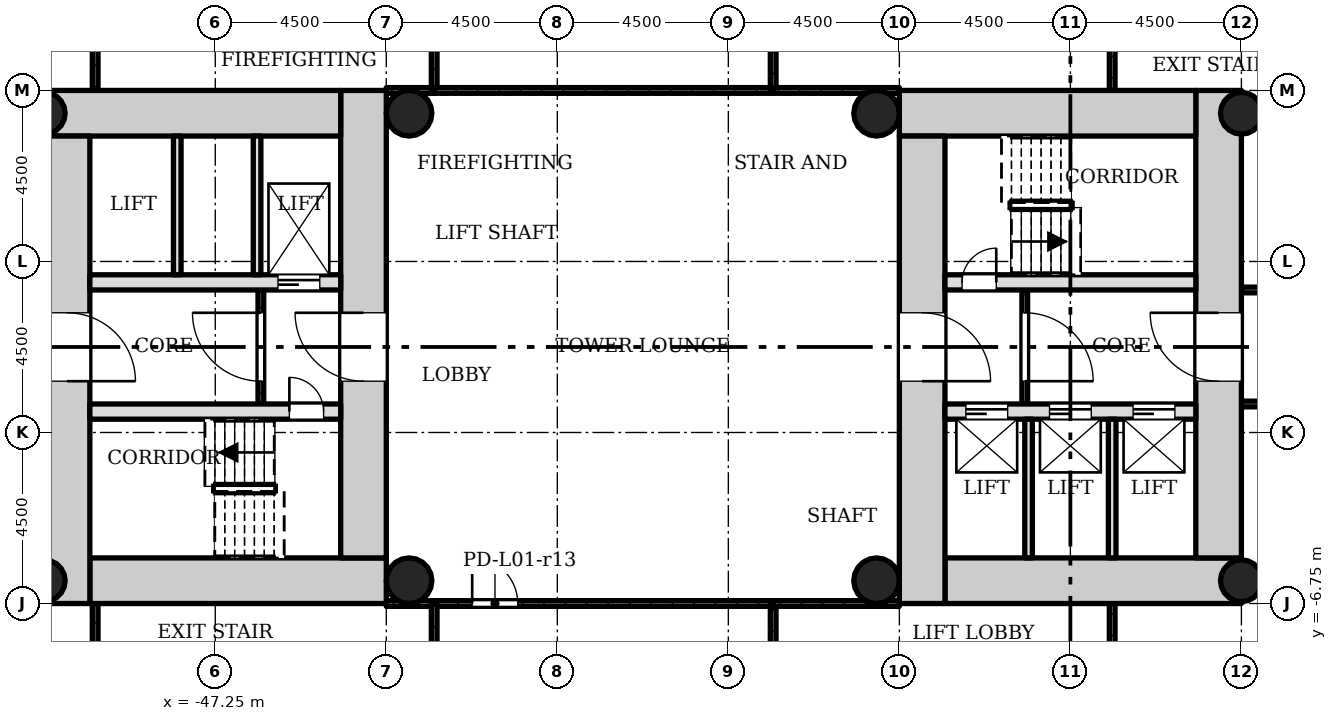
"""IFC4 building model, lengths in metres.
Left out: names, types, materials, properties, quantities, classifications, styles, units other than length and angle.
Written with IfcOpenShell. Run it as: python <this file> out.ifc"""

import sys

from ifc_helpers import new_model, si_unit, direction, frame, frame_2d, origin, origin_2d, place, context, subcontext, project, spatial, rectangle, hollow_circle, extrude, element, fill, save


model = new_model("IFC4")
c1 = context("Model", 3, precision=1e-05, world=origin(), true_north=direction((0.0, 1.0)))
c2 = subcontext(c1, "Body", "Model", "MODEL_VIEW")
j1 = project(units=[si_unit("LENGTHUNIT", "METRE"), si_unit("PLANEANGLEUNIT", "RADIAN")], contexts=[c1])
p1 = place(None, origin())
s1 = spatial("IfcSite", under=j1, at=p1, CompositionType="ELEMENT")
p2 = place(p1, origin())
s2 = spatial("IfcBuilding", under=s1, at=p2, CompositionType="ELEMENT")
p3 = place(p2, frame((0.0, 0.0, 6.0)))
s3 = spatial("IfcBuildingStorey", under=s2, at=p3, CompositionType="ELEMENT", Elevation=6.0)
p4 = place(p3, frame((-28.05, -6.15, 0.0), z_axis=(0.0, 0.0, 1.0), x_axis=(1.0, 0.0, 0.0)))
e1 = element("IfcWall", 1, at=p4, inside=s3, PredefinedType="SHEAR", context=c2, shape_type="SweptSolid", body=[
    extrude(rectangle(XDim=7.8, YDim=1.2, at=frame_2d((3.9, 0.0))), origin(), (0.0, 0.0, 1.0), 5.0),
])
p5 = place(p3, frame((-20.85, -5.55, 0.0), z_axis=(0.0, 0.0, 1.0), x_axis=(0.0, 1.0, 0.0)))
e2 = element("IfcWall", 2, at=p5, inside=s3, PredefinedType="SHEAR", context=c2, shape_type="SweptSolid", body=[
    extrude(rectangle(XDim=12.3, YDim=1.2, at=frame_2d((6.15, 0.0))), origin(), (0.0, 0.0, 1.0), 5.0),
])
p6 = place(p5, frame((4.65, 0.0, 0.0)))
e3 = element("IfcOpeningElement", 3, at=p6, cuts=e2, PredefinedType="OPENING", context=c2, shape_type="SweptSolid", body=[
    extrude(rectangle(XDim=1.8, YDim=2.1, at=frame_2d((0.9, 1.05))), frame((0.0, 0.61, 0.0), z_axis=(0.0, -1.0, 0.0), x_axis=(1.0, 0.0, 0.0)), (0.0, 0.0, 1.0), 1.22),
])
p7 = place(p3, frame((-21.45, 6.15, 0.0), z_axis=(0.0, 0.0, 1.0), x_axis=(-1.0, 0.0, 0.0)))
e4 = element("IfcWall", 4, at=p7, inside=s3, PredefinedType="SHEAR", context=c2, shape_type="SweptSolid", body=[
    extrude(rectangle(XDim=7.8, YDim=1.2, at=frame_2d((3.9, 0.0))), origin(), (0.0, 0.0, 1.0), 5.0),
])
p8 = place(p3, frame((-28.65, 5.55, 0.0), z_axis=(0.0, 0.0, 1.0), x_axis=(0.0, -1.0, 0.0)))
e5 = element("IfcWall", 5, at=p8, inside=s3, PredefinedType="SHEAR", context=c2, shape_type="SweptSolid", body=[
    extrude(rectangle(XDim=12.3, YDim=1.2, at=frame_2d((6.15, 0.0))), origin(), (0.0, 0.0, 1.0), 5.0),
])
p9 = place(p8, frame((4.65, 0.0, 0.0)))
e6 = element("IfcOpeningElement", 6, at=p9, cuts=e5, PredefinedType="OPENING", context=c2, shape_type="SweptSolid", body=[
    extrude(rectangle(XDim=1.8, YDim=2.1, at=frame_2d((0.9, 1.05))), frame((0.0, 0.61, 0.0), z_axis=(0.0, -1.0, 0.0), x_axis=(1.0, 0.0, 0.0)), (0.0, 0.0, 1.0), 1.22),
])
p10 = place(p3, frame((-28.05, -1.7, 0.0), z_axis=(0.0, 0.0, 1.0), x_axis=(1.0, 0.0, 0.0)))
e7 = element("IfcWall", 7, at=p10, inside=s3, PredefinedType="SHEAR", context=c2, shape_type="SweptSolid", body=[
    extrude(rectangle(XDim=6.6, YDim=0.4, at=frame_2d((3.3, 0.0))), origin(), (0.0, 0.0, 1.0), 5.0),
])
p11 = place(p10, frame((0.55, 0.0, 0.0)))
e8 = element("IfcOpeningElement", 8, at=p11, cuts=e7, PredefinedType="OPENING", context=c2, shape_type="SweptSolid", body=[
    extrude(rectangle(XDim=1.1, YDim=2.1, at=frame_2d((0.55, 1.05))), frame((0.0, 0.21, 0.0), z_axis=(0.0, -1.0, 0.0), x_axis=(1.0, 0.0, 0.0)), (0.0, 0.0, 1.0), 0.42),
])
p12 = place(p10, frame((2.75, 0.0, 0.0)))
e9 = element("IfcOpeningElement", 9, at=p12, cuts=e7, PredefinedType="OPENING", context=c2, shape_type="SweptSolid", body=[
    extrude(rectangle(XDim=1.1, YDim=2.1, at=frame_2d((0.55, 1.05))), frame((0.0, 0.21, 0.0), z_axis=(0.0, -1.0, 0.0), x_axis=(1.0, 0.0, 0.0)), (0.0, 0.0, 1.0), 0.42),
])
p13 = place(p10, frame((4.95, 0.0, 0.0)))
e10 = element("IfcOpeningElement", 10, at=p13, cuts=e7, PredefinedType="OPENING", context=c2, shape_type="SweptSolid", body=[
    extrude(rectangle(XDim=1.1, YDim=2.1, at=frame_2d((0.55, 1.05))), frame((0.0, 0.21, 0.0), z_axis=(0.0, -1.0, 0.0), x_axis=(1.0, 0.0, 0.0)), (0.0, 0.0, 1.0), 0.42),
])
p14 = place(p3, frame((-28.05, 1.7, 0.0), z_axis=(0.0, 0.0, 1.0), x_axis=(1.0, 0.0, 0.0)))
e11 = element("IfcWall", 11, at=p14, inside=s3, PredefinedType="SHEAR", context=c2, shape_type="SweptSolid", body=[
    extrude(rectangle(XDim=6.6, YDim=0.4, at=frame_2d((3.3, 0.0))), origin(), (0.0, 0.0, 1.0), 5.0),
])
p15 = place(p14, frame((0.45, 0.0, 0.0)))
e12 = element("IfcOpeningElement", 12, at=p15, cuts=e11, PredefinedType="OPENING", context=c2, shape_type="SweptSolid", body=[
    extrude(rectangle(XDim=0.9, YDim=2.1, at=frame_2d((0.45, 1.05))), frame((0.0, 0.21, 0.0), z_axis=(0.0, -1.0, 0.0), x_axis=(1.0, 0.0, 0.0)), (0.0, 0.0, 1.0), 0.42),
])
p16 = place(p3, frame((-50.55, -6.15, 0.0), z_axis=(0.0, 0.0, 1.0), x_axis=(1.0, 0.0, 0.0)))
e13 = element("IfcWall", 13, at=p16, inside=s3, PredefinedType="SHEAR", context=c2, shape_type="SweptSolid", body=[
    extrude(rectangle(XDim=7.8, YDim=1.2, at=frame_2d((3.9, 0.0))), origin(), (0.0, 0.0, 1.0), 5.0),
])
p17 = place(p3, frame((-43.35, -5.55, 0.0), z_axis=(0.0, 0.0, 1.0), x_axis=(0.0, 1.0, 0.0)))
e14 = element("IfcWall", 14, at=p17, inside=s3, PredefinedType="SHEAR", context=c2, shape_type="SweptSolid", body=[
    extrude(rectangle(XDim=12.3, YDim=1.2, at=frame_2d((6.15, 0.0))), origin(), (0.0, 0.0, 1.0), 5.0),
])
p18 = place(p17, frame((4.65, 0.0, 0.0)))
e15 = element("IfcOpeningElement", 15, at=p18, cuts=e14, PredefinedType="OPENING", context=c2, shape_type="SweptSolid", body=[
    extrude(rectangle(XDim=1.8, YDim=2.1, at=frame_2d((0.9, 1.05))), frame((0.0, 0.61, 0.0), z_axis=(0.0, -1.0, 0.0), x_axis=(1.0, 0.0, 0.0)), (0.0, 0.0, 1.0), 1.22),
])
p19 = place(p3, frame((-43.95, 6.15, 0.0), z_axis=(0.0, 0.0, 1.0), x_axis=(-1.0, 0.0, 0.0)))
e16 = element("IfcWall", 16, at=p19, inside=s3, PredefinedType="SHEAR", context=c2, shape_type="SweptSolid", body=[
    extrude(rectangle(XDim=7.8, YDim=1.2, at=frame_2d((3.9, 0.0))), origin(), (0.0, 0.0, 1.0), 5.0),
])
p20 = place(p3, frame((-51.15, 5.55, 0.0), z_axis=(0.0, 0.0, 1.0), x_axis=(0.0, -1.0, 0.0)))
e17 = element("IfcWall", 17, at=p20, inside=s3, PredefinedType="SHEAR", context=c2, shape_type="SweptSolid", body=[
    extrude(rectangle(XDim=12.3, YDim=1.2, at=frame_2d((6.15, 0.0))), origin(), (0.0, 0.0, 1.0), 5.0),
])
p21 = place(p20, frame((4.65, 0.0, 0.0)))
e18 = element("IfcOpeningElement", 18, at=p21, cuts=e17, PredefinedType="OPENING", context=c2, shape_type="SweptSolid", body=[
    extrude(rectangle(XDim=1.8, YDim=2.1, at=frame_2d((0.9, 1.05))), frame((0.0, 0.61, 0.0), z_axis=(0.0, -1.0, 0.0), x_axis=(1.0, 0.0, 0.0)), (0.0, 0.0, 1.0), 1.22),
])
p22 = place(p3, frame((-50.55, -1.7, 0.0), z_axis=(0.0, 0.0, 1.0), x_axis=(1.0, 0.0, 0.0)))
e19 = element("IfcWall", 19, at=p22, inside=s3, PredefinedType="SHEAR", context=c2, shape_type="SweptSolid", body=[
    extrude(rectangle(XDim=6.6, YDim=0.4, at=frame_2d((3.3, 0.0))), origin(), (0.0, 0.0, 1.0), 5.0),
])
p23 = place(p22, frame((5.25, 0.0, 0.0)))
e20 = element("IfcOpeningElement", 20, at=p23, cuts=e19, PredefinedType="OPENING", context=c2, shape_type="SweptSolid", body=[
    extrude(rectangle(XDim=0.9, YDim=2.1, at=frame_2d((0.45, 1.05))), frame((0.0, 0.21, 0.0), z_axis=(0.0, -1.0, 0.0), x_axis=(1.0, 0.0, 0.0)), (0.0, 0.0, 1.0), 0.42),
])
p24 = place(p3, frame((-50.55, 1.7, 0.0), z_axis=(0.0, 0.0, 1.0), x_axis=(1.0, 0.0, 0.0)))
e21 = element("IfcWall", 21, at=p24, inside=s3, PredefinedType="SHEAR", context=c2, shape_type="SweptSolid", body=[
    extrude(rectangle(XDim=6.6, YDim=0.4, at=frame_2d((3.3, 0.0))), origin(), (0.0, 0.0, 1.0), 5.0),
])
p25 = place(p24, frame((4.95, 0.0, 0.0)))
e22 = element("IfcOpeningElement", 22, at=p25, cuts=e21, PredefinedType="OPENING", context=c2, shape_type="SweptSolid", body=[
    extrude(rectangle(XDim=1.1, YDim=2.1, at=frame_2d((0.55, 1.05))), frame((0.0, 0.21, 0.0), z_axis=(0.0, -1.0, 0.0), x_axis=(1.0, 0.0, 0.0)), (0.0, 0.0, 1.0), 0.42),
])
for number, where, z_axis, x_axis in (
    (23, (-20.25, -6.15, 0.0), (0.0, 0.0, 1.0), (1.0, 0.0, 0.0)),
    (24, (-20.25, 6.15, 0.0), (0.0, 0.0, 1.0), (1.0, 0.0, 0.0)),
    (25, (-51.75, -6.15, 0.0), (0.0, 0.0, 1.0), (1.0, 0.0, 0.0)),
    (26, (-51.75, 6.15, 0.0), (0.0, 0.0, 1.0), (1.0, 0.0, 0.0)),
):
    element("IfcColumn", number, at=place(p3, frame(where, z_axis=z_axis, x_axis=x_axis)), inside=s3, PredefinedType="COLUMN", context=c2, shape_type="SweptSolid", body=[
        extrude(hollow_circle(Radius=0.55, WallThickness=0.04, at=origin_2d()), origin(), (0.0, 0.0, 1.0), 5.0),
    ])
for number, where, z_axis, x_axis in (
    (27, (-42.15, -6.15, 0.0), (0.0, 0.0, 1.0), (1.0, 0.0, 0.0)),
    (28, (-29.85, -6.15, 0.0), (0.0, 0.0, 1.0), (1.0, 0.0, 0.0)),
    (29, (-29.85, 6.15, 0.0), (0.0, 0.0, 1.0), (1.0, 0.0, 0.0)),
    (30, (-42.15, 6.15, 0.0), (0.0, 0.0, 1.0), (1.0, 0.0, 0.0)),
):
    element("IfcColumn", number, at=place(p3, frame(where, z_axis=z_axis, x_axis=x_axis)), inside=s3, PredefinedType="COLUMN", context=c2, shape_type="SweptSolid", body=[
        extrude(hollow_circle(Radius=0.6, WallThickness=0.045, at=origin_2d()), origin(), (0.0, 0.0, 1.0), 5.0),
    ])
p26 = place(p3, frame((-25.95, -1.5, 0.0), z_axis=(0.0, 0.0, 1.0), x_axis=(0.0, 1.0, 0.0)))
e31 = element("IfcWall", 31, at=p26, inside=s3, PredefinedType="PARTITIONING", context=c2, shape_type="SweptSolid", body=[
    extrude(rectangle(XDim=3.0, YDim=0.15, at=frame_2d((1.5, 0.0))), origin(), (0.0, 0.0, 1.0), 4.58),
])
p27 = place(p26, frame((0.6, 0.0, 0.0)))
e32 = element("IfcOpeningElement", 32, at=p27, cuts=e31, PredefinedType="OPENING", context=c2, shape_type="SweptSolid", body=[
    extrude(rectangle(XDim=1.8, YDim=2.1, at=frame_2d((0.9, 1.05))), frame((0.0, 0.085, 0.0), z_axis=(0.0, -1.0, 0.0), x_axis=(1.0, 0.0, 0.0)), (0.0, 0.0, 1.0), 0.17),
])
for number, where, z_axis, x_axis in (
    (33, (-25.85, -5.55, 0.0), (0.0, 0.0, 1.0), (0.0, 1.0, 0.0)),
    (34, (-23.65, -5.55, 0.0), (0.0, 0.0, 1.0), (0.0, 1.0, 0.0)),
):
    element("IfcWall", number, at=place(p3, frame(where, z_axis=z_axis, x_axis=x_axis)), inside=s3, PredefinedType="SOLIDWALL", context=c2, shape_type="SweptSolid", body=[
        extrude(rectangle(XDim=3.65, YDim=0.2, at=frame_2d((1.825, 0.0))), origin(), (0.0, 0.0, 1.0), 4.58),
    ])
p28 = place(p3, frame((-46.05, 1.5, 0.0), z_axis=(0.0, 0.0, 1.0), x_axis=(0.0, -1.0, 0.0)))
e35 = element("IfcWall", 35, at=p28, inside=s3, PredefinedType="PARTITIONING", context=c2, shape_type="SweptSolid", body=[
    extrude(rectangle(XDim=3.0, YDim=0.15, at=frame_2d((1.5, 0.0))), origin(), (0.0, 0.0, 1.0), 4.58),
])
p29 = place(p28, frame((0.6, 0.0, 0.0)))
e36 = element("IfcOpeningElement", 36, at=p29, cuts=e35, PredefinedType="OPENING", context=c2, shape_type="SweptSolid", body=[
    extrude(rectangle(XDim=1.8, YDim=2.1, at=frame_2d((0.9, 1.05))), frame((0.0, 0.085, 0.0), z_axis=(0.0, -1.0, 0.0), x_axis=(1.0, 0.0, 0.0)), (0.0, 0.0, 1.0), 0.17),
])
for number, where, z_axis, x_axis in (
    (37, (-46.15, 5.55, 0.0), (0.0, 0.0, 1.0), (0.0, -1.0, 0.0)),
    (38, (-48.25, 5.55, 0.0), (0.0, 0.0, 1.0), (0.0, -1.0, 0.0)),
):
    element("IfcWall", number, at=place(p3, frame(where, z_axis=z_axis, x_axis=x_axis)), inside=s3, PredefinedType="SOLIDWALL", context=c2, shape_type="SweptSolid", body=[
        extrude(rectangle(XDim=3.65, YDim=0.2, at=frame_2d((1.825, 0.0))), origin(), (0.0, 0.0, 1.0), 4.58),
    ])
p30 = place(p3, frame((-50.41, -6.75, 0.0), z_axis=(0.0, 0.0, 1.0), x_axis=(0.0, -1.0, 0.0)))
e39 = element("IfcWall", 39, at=p30, inside=s3, PredefinedType="PARTITIONING", context=c2, shape_type="SweptSolid", body=[
    extrude(rectangle(XDim=16.75, YDim=0.15, at=frame_2d((8.375, 0.0))), origin(), (0.0, 0.0, 1.0), 4.58),
])
for number, where, z_axis, x_axis in (
    (40, (-42.75, -6.75, 0.0), (0.0, 0.0, 1.0), (1.0, 0.0, 0.0)),
    (41, (-41.49, 6.75, 0.0), (0.0, 0.0, 1.0), (-1.0, 0.0, 0.0)),
):
    element("IfcWall", number, at=place(p3, frame(where, z_axis=z_axis, x_axis=x_axis)), inside=s3, PredefinedType="PARTITIONING", context=c2, shape_type="SweptSolid", body=[
        extrude(rectangle(XDim=1.26, YDim=0.15, at=frame_2d((0.63, 0.0))), origin(), (0.0, 0.0, 1.0), 4.58),
    ])
for number, where, z_axis, x_axis in (
    (42, (-50.41, 6.75, 0.0), (0.0, 0.0, 1.0), (0.0, 1.0, 0.0)),
    (43, (-41.49, 26.5, 0.0), (0.0, 0.0, 1.0), (0.0, -1.0, 0.0)),
):
    element("IfcWall", number, at=place(p3, frame(where, z_axis=z_axis, x_axis=x_axis)), inside=s3, PredefinedType="PARTITIONING", context=c2, shape_type="SweptSolid", body=[
        extrude(rectangle(XDim=19.75, YDim=0.15, at=frame_2d((9.875, 0.0))), origin(), (0.0, 0.0, 1.0), 4.58),
    ])
p31 = place(p3, frame((-41.49, -6.75, 0.0), z_axis=(0.0, 0.0, 1.0), x_axis=(1.0, 0.0, 0.0)))
e44 = element("IfcWall", 44, at=p31, inside=s3, PredefinedType="PARTITIONING", context=c2, shape_type="SweptSolid", body=[
    extrude(rectangle(XDim=8.92, YDim=0.15, at=frame_2d((4.46, 0.0))), origin(), (0.0, 0.0, 1.0), 4.58),
])
p32 = place(p31, frame((1.0, 0.0, 0.0)))
e45 = element("IfcOpeningElement", 45, at=p32, cuts=e44, PredefinedType="OPENING", context=c2, shape_type="SweptSolid", body=[
    extrude(rectangle(XDim=1.2, YDim=2.1, at=frame_2d((0.6, 1.05))), frame((0.0, 0.085, 0.0), z_axis=(0.0, -1.0, 0.0), x_axis=(1.0, 0.0, 0.0)), (0.0, 0.0, 1.0), 0.17),
])
for number, where, z_axis, x_axis in (
    (46, (-41.49, -23.5, 0.0), (0.0, 0.0, 1.0), (0.0, 1.0, 0.0)),
    (47, (-32.57, -6.75, 0.0), (0.0, 0.0, 1.0), (0.0, -1.0, 0.0)),
):
    element("IfcWall", number, at=place(p3, frame(where, z_axis=z_axis, x_axis=x_axis)), inside=s3, PredefinedType="PARTITIONING", context=c2, shape_type="SweptSolid", body=[
        extrude(rectangle(XDim=16.75, YDim=0.15, at=frame_2d((8.375, 0.0))), origin(), (0.0, 0.0, 1.0), 4.58),
    ])
p33 = place(p3, frame((-32.57, 6.75, 0.0), z_axis=(0.0, 0.0, 1.0), x_axis=(-1.0, 0.0, 0.0)))
e48 = element("IfcWall", 48, at=p33, inside=s3, PredefinedType="PARTITIONING", context=c2, shape_type="SweptSolid", body=[
    extrude(rectangle(XDim=8.92, YDim=0.15, at=frame_2d((4.46, 0.0))), origin(), (0.0, 0.0, 1.0), 4.58),
])
p34 = place(p3, frame((-32.57, 26.5, 0.0), z_axis=(0.0, 0.0, 1.0), x_axis=(0.0, -1.0, 0.0)))
e49 = element("IfcWall", 49, at=p34, inside=s3, PredefinedType="PARTITIONING", context=c2, shape_type="SweptSolid", body=[
    extrude(rectangle(XDim=19.75, YDim=0.15, at=frame_2d((9.875, 0.0))), origin(), (0.0, 0.0, 1.0), 4.58),
])
p35 = place(p3, frame((-32.57, -6.75, 0.0), z_axis=(0.0, 0.0, 1.0), x_axis=(1.0, 0.0, 0.0)))
e50 = element("IfcWall", 50, at=p35, inside=s3, PredefinedType="PARTITIONING", context=c2, shape_type="SweptSolid", body=[
    extrude(rectangle(XDim=3.32, YDim=0.15, at=frame_2d((1.66, 0.0))), origin(), (0.0, 0.0, 1.0), 4.58),
])
p36 = place(p3, frame((-23.65, -6.75, 0.0), z_axis=(0.0, 0.0, 1.0), x_axis=(0.0, -1.0, 0.0)))
e51 = element("IfcWall", 51, at=p36, inside=s3, PredefinedType="PARTITIONING", context=c2, shape_type="SweptSolid", body=[
    extrude(rectangle(XDim=16.75, YDim=0.15, at=frame_2d((8.375, 0.0))), origin(), (0.0, 0.0, 1.0), 4.58),
])
p37 = place(p3, frame((-29.25, 6.75, 0.0), z_axis=(0.0, 0.0, 1.0), x_axis=(-1.0, 0.0, 0.0)))
e52 = element("IfcWall", 52, at=p37, inside=s3, PredefinedType="PARTITIONING", context=c2, shape_type="SweptSolid", body=[
    extrude(rectangle(XDim=3.32, YDim=0.15, at=frame_2d((1.66, 0.0))), origin(), (0.0, 0.0, 1.0), 4.58),
])
p38 = place(p3, frame((-23.65, 26.5, 0.0), z_axis=(0.0, 0.0, 1.0), x_axis=(0.0, -1.0, 0.0)))
e53 = element("IfcWall", 53, at=p38, inside=s3, PredefinedType="PARTITIONING", context=c2, shape_type="SweptSolid", body=[
    extrude(rectangle(XDim=19.75, YDim=0.15, at=frame_2d((9.875, 0.0))), origin(), (0.0, 0.0, 1.0), 4.58),
])
for number, where, z_axis, x_axis in (
    (54, (-20.25, -1.5, 0.0), (0.0, 0.0, 1.0), (1.0, 0.0, 0.0)),
    (55, (-14.73, 1.5, 0.0), (0.0, 0.0, 1.0), (-1.0, 0.0, 0.0)),
):
    element("IfcWall", number, at=place(p3, frame(where, z_axis=z_axis, x_axis=x_axis)), inside=s3, PredefinedType="PARTITIONING", context=c2, shape_type="SweptSolid", body=[
        extrude(rectangle(XDim=5.52, YDim=0.15, at=frame_2d((2.76, 0.0))), origin(), (0.0, 0.0, 1.0), 4.58),
    ])
p39 = place(p27, origin())
e56 = element("IfcDoor", 56, at=p39, inside=s3, OperationType="SINGLE_SWING_LEFT", PredefinedType="DOOR", context=c2, shape_type="SweptSolid", body=[
    extrude(rectangle(XDim=1.8, YDim=2.1, at=frame_2d((0.9, 1.05))), frame((0.0, 0.025, 0.0), z_axis=(0.0, -1.0, 0.0), x_axis=(1.0, 0.0, 0.0)), (0.0, 0.0, 1.0), 0.05),
])
fill(e32, e56)
p40 = place(p29, origin())
e57 = element("IfcDoor", 57, at=p40, inside=s3, OperationType="SINGLE_SWING_LEFT", PredefinedType="DOOR", context=c2, shape_type="SweptSolid", body=[
    extrude(rectangle(XDim=1.8, YDim=2.1, at=frame_2d((0.9, 1.05))), frame((0.0, 0.025, 0.0), z_axis=(0.0, -1.0, 0.0), x_axis=(1.0, 0.0, 0.0)), (0.0, 0.0, 1.0), 0.05),
])
fill(e36, e57)
p41 = place(p32, origin())
e58 = element("IfcDoor", 58, at=p41, inside=s3, OperationType="SINGLE_SWING_RIGHT", PredefinedType="DOOR", context=c2, shape_type="SweptSolid", body=[
    extrude(rectangle(XDim=1.2, YDim=2.1, at=frame_2d((0.6, 1.05))), frame((0.0, 0.025, 0.0), z_axis=(0.0, -1.0, 0.0), x_axis=(1.0, 0.0, 0.0)), (0.0, 0.0, 1.0), 0.05),
])
fill(e45, e58)
p42 = place(p15, origin())
e59 = element("IfcDoor", 59, at=p42, inside=s3, OperationType="SINGLE_SWING_LEFT", PredefinedType="DOOR", context=c2, shape_type="SweptSolid", body=[
    extrude(rectangle(XDim=0.9, YDim=2.1, at=frame_2d((0.45, 1.05))), frame((0.0, 0.025, 0.0), z_axis=(0.0, -1.0, 0.0), x_axis=(1.0, 0.0, 0.0)), (0.0, 0.0, 1.0), 0.05),
])
fill(e12, e59)
p43 = place(p11, origin())
e60 = element("IfcDoor", 60, at=p43, inside=s3, OperationType="SLIDING_TO_LEFT", PredefinedType="DOOR", context=c2, shape_type="SweptSolid", body=[
    extrude(rectangle(XDim=1.1, YDim=2.1, at=frame_2d((0.55, 1.05))), frame((0.0, 0.025, 0.0), z_axis=(0.0, -1.0, 0.0), x_axis=(1.0, 0.0, 0.0)), (0.0, 0.0, 1.0), 0.05),
])
fill(e8, e60)
p44 = place(p12, origin())
e61 = element("IfcDoor", 61, at=p44, inside=s3, OperationType="SLIDING_TO_LEFT", PredefinedType="DOOR", context=c2, shape_type="SweptSolid", body=[
    extrude(rectangle(XDim=1.1, YDim=2.1, at=frame_2d((0.55, 1.05))), frame((0.0, 0.025, 0.0), z_axis=(0.0, -1.0, 0.0), x_axis=(1.0, 0.0, 0.0)), (0.0, 0.0, 1.0), 0.05),
])
fill(e9, e61)
p45 = place(p13, origin())
e62 = element("IfcDoor", 62, at=p45, inside=s3, OperationType="SLIDING_TO_LEFT", PredefinedType="DOOR", context=c2, shape_type="SweptSolid", body=[
    extrude(rectangle(XDim=1.1, YDim=2.1, at=frame_2d((0.55, 1.05))), frame((0.0, 0.025, 0.0), z_axis=(0.0, -1.0, 0.0), x_axis=(1.0, 0.0, 0.0)), (0.0, 0.0, 1.0), 0.05),
])
fill(e10, e62)
p46 = place(p9, origin())
e63 = element("IfcDoor", 63, at=p46, inside=s3, OperationType="SINGLE_SWING_LEFT", PredefinedType="DOOR", context=c2, shape_type="SweptSolid", body=[
    extrude(rectangle(XDim=1.8, YDim=2.1, at=frame_2d((0.9, 1.05))), frame((0.0, 0.025, 0.0), z_axis=(0.0, -1.0, 0.0), x_axis=(1.0, 0.0, 0.0)), (0.0, 0.0, 1.0), 0.05),
])
fill(e6, e63)
p47 = place(p6, origin())
e64 = element("IfcDoor", 64, at=p47, inside=s3, OperationType="SINGLE_SWING_LEFT", PredefinedType="DOOR", context=c2, shape_type="SweptSolid", body=[
    extrude(rectangle(XDim=1.8, YDim=2.1, at=frame_2d((0.9, 1.05))), frame((0.0, 0.025, 0.0), z_axis=(0.0, -1.0, 0.0), x_axis=(1.0, 0.0, 0.0)), (0.0, 0.0, 1.0), 0.05),
])
fill(e3, e64)
p48 = place(p23, origin())
e65 = element("IfcDoor", 65, at=p48, inside=s3, OperationType="SINGLE_SWING_RIGHT", PredefinedType="DOOR", context=c2, shape_type="SweptSolid", body=[
    extrude(rectangle(XDim=0.9, YDim=2.1, at=frame_2d((0.45, 1.05))), frame((0.0, 0.025, 0.0), z_axis=(0.0, -1.0, 0.0), x_axis=(1.0, 0.0, 0.0)), (0.0, 0.0, 1.0), 0.05),
])
fill(e20, e65)
p49 = place(p25, origin())
e66 = element("IfcDoor", 66, at=p49, inside=s3, OperationType="SLIDING_TO_LEFT", PredefinedType="DOOR", context=c2, shape_type="SweptSolid", body=[
    extrude(rectangle(XDim=1.1, YDim=2.1, at=frame_2d((0.55, 1.05))), frame((0.0, 0.025, 0.0), z_axis=(0.0, -1.0, 0.0), x_axis=(1.0, 0.0, 0.0)), (0.0, 0.0, 1.0), 0.05),
])
fill(e22, e66)
p50 = place(p18, origin())
e67 = element("IfcDoor", 67, at=p50, inside=s3, OperationType="SINGLE_SWING_LEFT", PredefinedType="DOOR", context=c2, shape_type="SweptSolid", body=[
    extrude(rectangle(XDim=1.8, YDim=2.1, at=frame_2d((0.9, 1.05))), frame((0.0, 0.025, 0.0), z_axis=(0.0, -1.0, 0.0), x_axis=(1.0, 0.0, 0.0)), (0.0, 0.0, 1.0), 0.05),
])
fill(e15, e67)
p51 = place(p21, origin())
e68 = element("IfcDoor", 68, at=p51, inside=s3, OperationType="SINGLE_SWING_LEFT", PredefinedType="DOOR", context=c2, shape_type="SweptSolid", body=[
    extrude(rectangle(XDim=1.8, YDim=2.1, at=frame_2d((0.9, 1.05))), frame((0.0, 0.025, 0.0), z_axis=(0.0, -1.0, 0.0), x_axis=(1.0, 0.0, 0.0)), (0.0, 0.0, 1.0), 0.05),
])
fill(e18, e68)
save(model, sys.argv[1])
